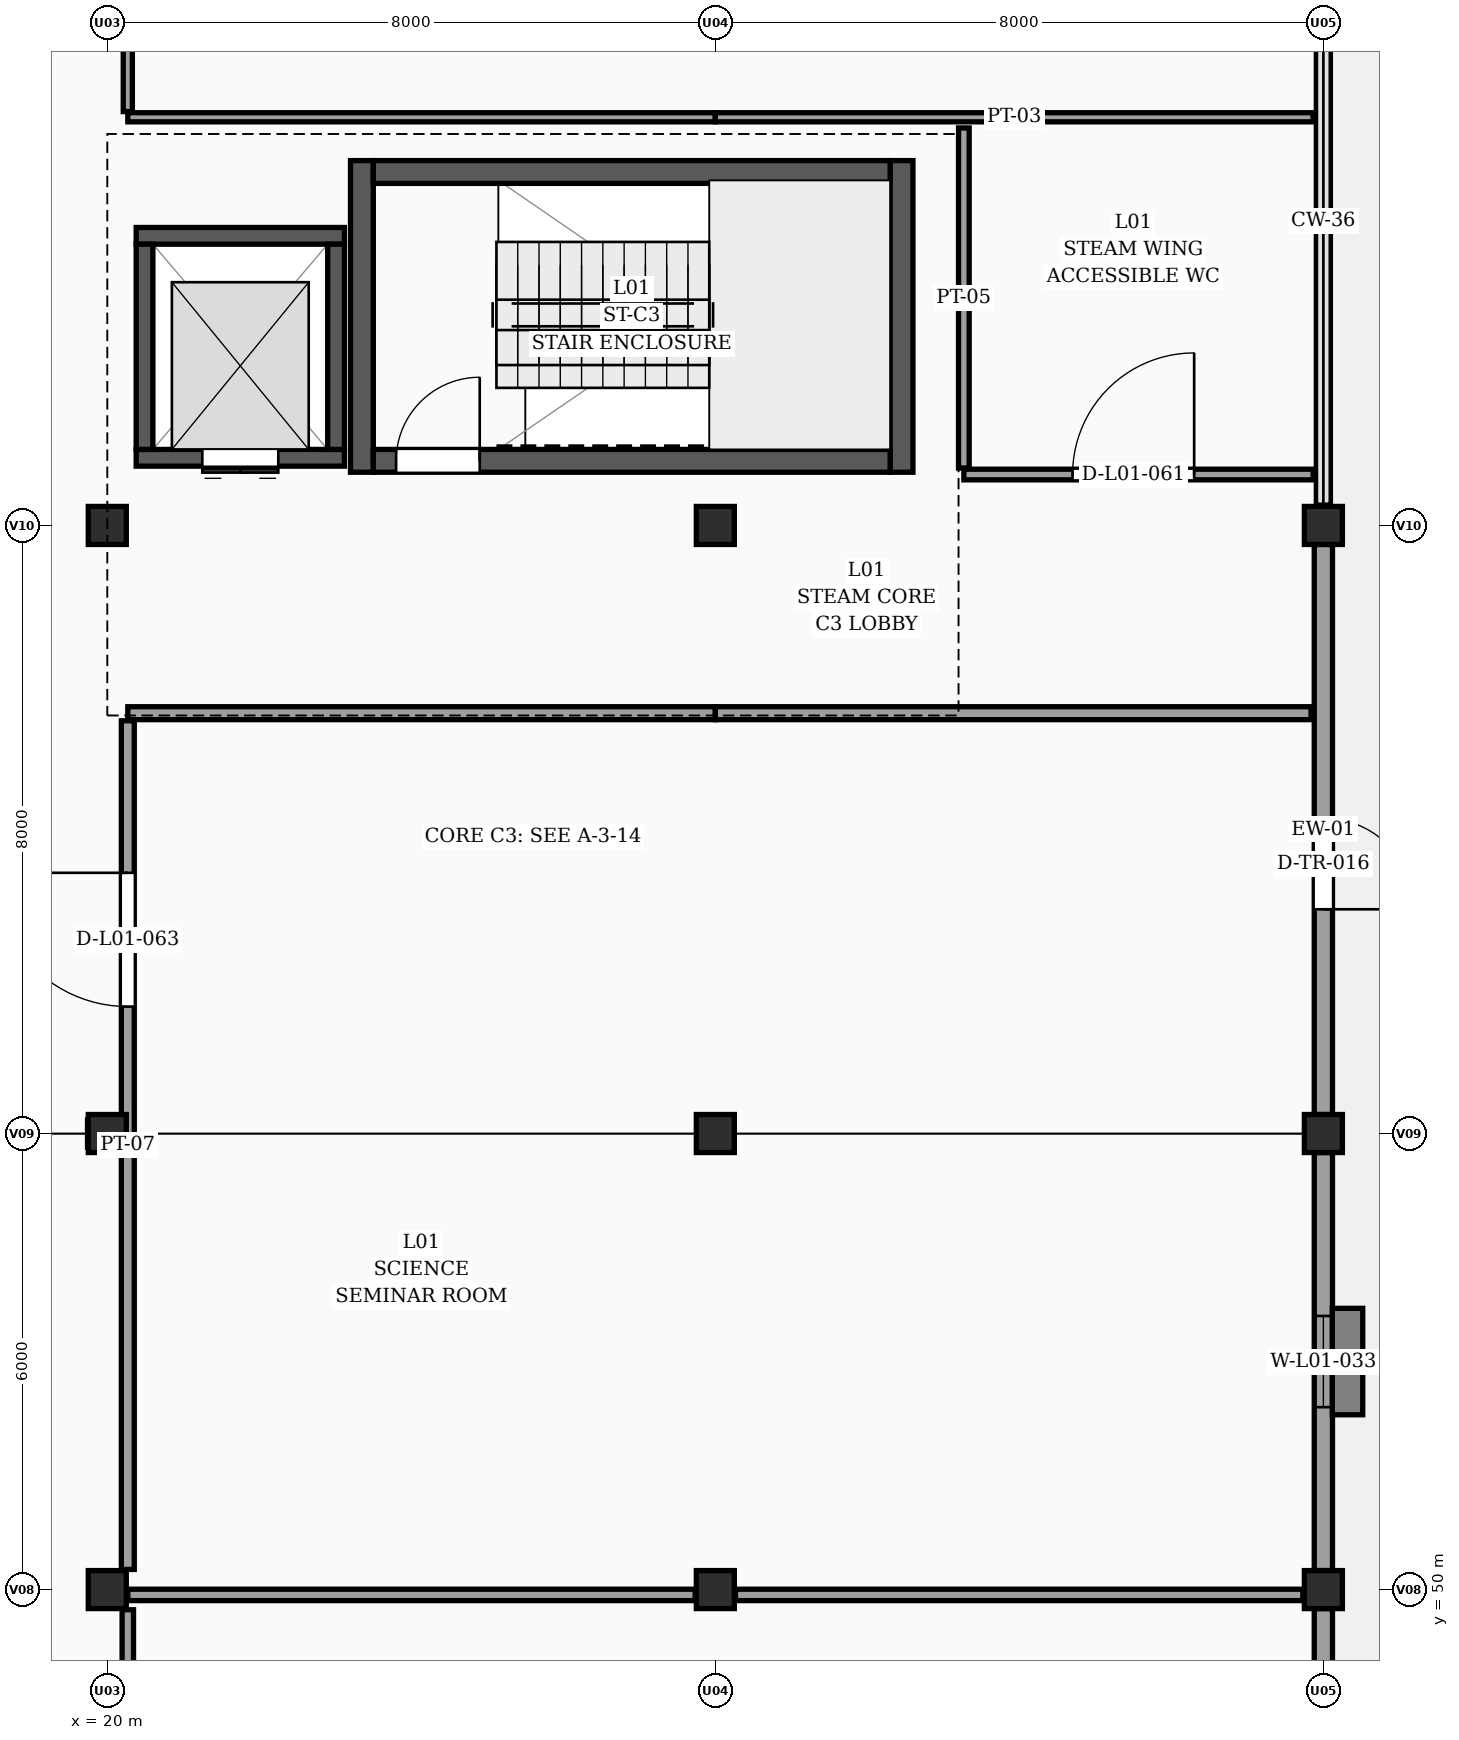
"""IFC4 building model, lengths in metres.
Left out: names, types, materials, properties, quantities, classifications, styles, units other than length and angle.
Written with IfcOpenShell. Run it as: python <this file> out.ifc"""

import sys

from ifc_helpers import new_model, si_unit, direction, frame, frame_2d, origin, origin_2d, place, context, subcontext, project, spatial, rectangle, extrude, element, fill, save


model = new_model("IFC4")
c1 = context("Model", 3, precision=1e-05, world=origin(), true_north=direction((0.0, 1.0)))
c2 = subcontext(c1, "Body", "Model", "MODEL_VIEW")
j1 = project(units=[si_unit("LENGTHUNIT", "METRE"), si_unit("PLANEANGLEUNIT", "RADIAN")], contexts=[c1])
p1 = place(None, origin())
s1 = spatial("IfcSite", under=j1, at=p1, CompositionType="ELEMENT")
p2 = place(p1, origin())
s2 = spatial("IfcBuilding", under=s1, at=p2, CompositionType="ELEMENT")
p3 = place(p2, frame((0.0, 0.0, 4.5)))
s3 = spatial("IfcBuildingStorey", under=s2, at=p3, CompositionType="ELEMENT", Elevation=4.5)
for number, where, z_axis, x_axis in (
    (1, (20.0, 50.0, 0.0), (0.0, 0.0, 1.0), (1.0, 0.0, 0.0)),
    (2, (20.0, 56.0, 0.0), (0.0, 0.0, 1.0), (1.0, 0.0, 0.0)),
    (3, (20.0, 64.0, 0.0), (0.0, 0.0, 1.0), (1.0, 0.0, 0.0)),
    (4, (28.0, 50.0, 0.0), (0.0, 0.0, 1.0), (1.0, 0.0, 0.0)),
    (5, (28.0, 56.0, 0.0), (0.0, 0.0, 1.0), (1.0, 0.0, 0.0)),
    (6, (28.0, 64.0, 0.0), (0.0, 0.0, 1.0), (1.0, 0.0, 0.0)),
    (7, (36.0, 50.0, 0.0), (0.0, 0.0, 1.0), (1.0, 0.0, 0.0)),
    (8, (36.0, 56.0, 0.0), (0.0, 0.0, 1.0), (1.0, 0.0, 0.0)),
    (9, (36.0, 64.0, 0.0), (0.0, 0.0, 1.0), (1.0, 0.0, 0.0)),
):
    element("IfcColumn", number, at=place(p3, frame(where, z_axis=z_axis, x_axis=x_axis)), inside=s3, PredefinedType="COLUMN", context=c2, shape_type="SweptSolid", body=[
        extrude(rectangle(XDim=0.5, YDim=0.5, at=origin_2d()), origin(), (0.0, 0.0, 1.0), 3.9),
    ])
p4 = place(p3, frame((36.0, 71.75, 0.0), z_axis=(0.0, 0.0, 1.0), x_axis=(0.0, -1.0, 0.0)))
e10 = element("IfcWall", 10, at=p4, inside=s3, PredefinedType="SOLIDWALL", context=c2, shape_type="SweptSolid", body=[
    extrude(rectangle(XDim=7.5, YDim=0.185, at=frame_2d((3.75, 0.0))), origin(), (0.0, 0.0, 1.0), 0.95),
])
p5 = place(p3, frame((36.0, 63.75, 0.0), z_axis=(0.0, 0.0, 1.0), x_axis=(0.0, -1.0, 0.0)))
e11 = element("IfcWall", 11, at=p5, inside=s3, PredefinedType="SOLIDWALL", context=c2, shape_type="SweptSolid", body=[
    extrude(rectangle(XDim=7.5, YDim=0.24, at=frame_2d((3.75, 0.0))), origin(), (0.0, 0.0, 1.0), 3.0),
])
p6 = place(p5, frame((3.6, 0.0, 0.0)))
e12 = element("IfcOpeningElement", 12, at=p6, cuts=e11, PredefinedType="OPENING", context=c2, shape_type="SweptSolid", body=[
    extrude(rectangle(XDim=1.2, YDim=2.15, at=frame_2d((0.6, 1.075))), frame((0.0, 0.13, 0.0), z_axis=(0.0, -1.0, 0.0), x_axis=(1.0, 0.0, 0.0)), (0.0, 0.0, 1.0), 0.26),
])
p7 = place(p3, frame((36.0, 55.75, 0.0), z_axis=(0.0, 0.0, 1.0), x_axis=(0.0, -1.0, 0.0)))
e13 = element("IfcWall", 13, at=p7, inside=s3, PredefinedType="SOLIDWALL", context=c2, shape_type="SweptSolid", body=[
    extrude(rectangle(XDim=5.5, YDim=0.24, at=frame_2d((2.75, 0.0))), origin(), (0.0, 0.0, 1.0), 3.0),
])
p8 = place(p7, frame((2.15, 0.0, 0.95)))
e14 = element("IfcOpeningElement", 14, at=p8, cuts=e13, PredefinedType="OPENING", context=c2, shape_type="SweptSolid", body=[
    extrude(rectangle(XDim=1.2, YDim=1.5, at=frame_2d((0.6, 0.75))), frame((0.0, 0.13, 0.0), z_axis=(0.0, -1.0, 0.0), x_axis=(1.0, 0.0, 0.0)), (0.0, 0.0, 1.0), 0.26),
])
p9 = place(p3, frame((36.0, 49.75, 0.0), z_axis=(0.0, 0.0, 1.0), x_axis=(0.0, -1.0, 0.0)))
e15 = element("IfcWall", 15, at=p9, inside=s3, PredefinedType="SOLIDWALL", context=c2, shape_type="SweptSolid", body=[
    extrude(rectangle(XDim=5.5, YDim=0.24, at=frame_2d((2.75, 0.0))), origin(), (0.0, 0.0, 1.0), 3.0),
])
p10 = place(p9, frame((2.075, 0.0, 0.95)))
e16 = element("IfcOpeningElement", 16, at=p10, cuts=e15, PredefinedType="OPENING", context=c2, shape_type="SweptSolid", body=[
    extrude(rectangle(XDim=1.35, YDim=1.5, at=frame_2d((0.675, 0.75))), frame((0.0, 0.13, 0.0), z_axis=(0.0, -1.0, 0.0), x_axis=(1.0, 0.0, 0.0)), (0.0, 0.0, 1.0), 0.26),
])
for number, where, z_axis, x_axis in (
    (17, (23.35, 64.7, 0.0), (0.0, 0.0, 1.0), (0.0, 1.0, 0.0)),
    (18, (30.45, 68.8, 0.0), (0.0, 0.0, 1.0), (0.0, -1.0, 0.0)),
):
    element("IfcWall", number, at=place(p3, frame(where, z_axis=z_axis, x_axis=x_axis)), inside=s3, PredefinedType="SHEAR", context=c2, shape_type="SweptSolid", body=[
        extrude(rectangle(XDim=4.1, YDim=0.3, at=frame_2d((2.05, 0.0))), origin(), (0.0, 0.0, 1.0), 3.65),
    ])
p11 = place(p3, frame((23.5, 64.85, 0.0), z_axis=(0.0, 0.0, 1.0), x_axis=(1.0, 0.0, 0.0)))
e19 = element("IfcWall", 19, at=p11, inside=s3, PredefinedType="SHEAR", context=c2, shape_type="SweptSolid", body=[
    extrude(rectangle(XDim=6.8, YDim=0.3, at=frame_2d((3.4, 0.0))), origin(), (0.0, 0.0, 1.0), 3.65),
])
p12 = place(p11, frame((0.3, 0.0, 0.0)))
e20 = element("IfcOpeningElement", 20, at=p12, cuts=e19, PredefinedType="OPENING", context=c2, shape_type="SweptSolid", body=[
    extrude(rectangle(XDim=1.1, YDim=2.15, at=frame_2d((0.55, 1.075))), frame((0.0, 0.16, 0.0), z_axis=(0.0, -1.0, 0.0), x_axis=(1.0, 0.0, 0.0)), (0.0, 0.0, 1.0), 0.32),
])
p13 = place(p3, frame((30.3, 68.65, 0.0), z_axis=(0.0, 0.0, 1.0), x_axis=(-1.0, 0.0, 0.0)))
e21 = element("IfcWall", 21, at=p13, inside=s3, PredefinedType="SHEAR", context=c2, shape_type="SweptSolid", body=[
    extrude(rectangle(XDim=6.8, YDim=0.3, at=frame_2d((3.4, 0.0))), origin(), (0.0, 0.0, 1.0), 3.65),
])
p14 = place(p3, frame((23.12, 64.89, 0.0), z_axis=(0.0, 0.0, 1.0), x_axis=(-1.0, 0.0, 0.0)))
e22 = element("IfcWall", 22, at=p14, inside=s3, PredefinedType="SHEAR", context=c2, shape_type="SweptSolid", body=[
    extrude(rectangle(XDim=2.74, YDim=0.22, at=frame_2d((1.37, 0.0))), origin(), (0.0, 0.0, 1.0), 3.65),
])
p15 = place(p14, frame((0.87, 0.0, 0.0)))
e23 = element("IfcOpeningElement", 23, at=p15, cuts=e22, PredefinedType="OPENING", context=c2, shape_type="SweptSolid", body=[
    extrude(rectangle(XDim=1.0, YDim=2.15, at=frame_2d((0.5, 1.075))), frame((0.0, 0.12, 0.0), z_axis=(0.0, -1.0, 0.0), x_axis=(1.0, 0.0, 0.0)), (0.0, 0.0, 1.0), 0.24),
])
p16 = place(p3, frame((20.38, 67.81, 0.0), z_axis=(0.0, 0.0, 1.0), x_axis=(1.0, 0.0, 0.0)))
e24 = element("IfcWall", 24, at=p16, inside=s3, PredefinedType="SHEAR", context=c2, shape_type="SweptSolid", body=[
    extrude(rectangle(XDim=2.74, YDim=0.22, at=frame_2d((1.37, 0.0))), origin(), (0.0, 0.0, 1.0), 3.65),
])
for number, where, z_axis, x_axis in (
    (25, (20.49, 65.0, 0.0), (0.0, 0.0, 1.0), (0.0, 1.0, 0.0)),
    (26, (23.01, 67.7, 0.0), (0.0, 0.0, 1.0), (0.0, -1.0, 0.0)),
):
    element("IfcWall", number, at=place(p3, frame(where, z_axis=z_axis, x_axis=x_axis)), inside=s3, PredefinedType="SHEAR", context=c2, shape_type="SweptSolid", body=[
        extrude(rectangle(XDim=2.7, YDim=0.22, at=frame_2d((1.35, 0.0))), origin(), (0.0, 0.0, 1.0), 3.65),
    ])
p17 = place(p3, frame((20.27, 69.37, 0.0), z_axis=(0.0, 0.0, 1.0), x_axis=(1.0, 0.0, 0.0)))
e27 = element("IfcWall", 27, at=p17, inside=s3, PredefinedType="PARTITIONING", context=c2, shape_type="SweptSolid", body=[
    extrude(rectangle(XDim=7.73, YDim=0.12, at=frame_2d((3.865, 0.0))), origin(), (0.0, 0.0, 1.0), 3.65),
])
p18 = place(p3, frame((28.0, 69.37, 0.0), z_axis=(0.0, 0.0, 1.0), x_axis=(1.0, 0.0, 0.0)))
e28 = element("IfcWall", 28, at=p18, inside=s3, PredefinedType="PARTITIONING", context=c2, shape_type="SweptSolid", body=[
    extrude(rectangle(XDim=7.865, YDim=0.12, at=frame_2d((3.933, 0.0))), origin(), (0.0, 0.0, 1.0), 3.65),
])
p19 = place(p3, frame((20.27, 69.445, 0.0), z_axis=(0.0, 0.0, 1.0), x_axis=(0.0, 1.0, 0.0)))
e29 = element("IfcWall", 29, at=p19, inside=s3, PredefinedType="PARTITIONING", context=c2, shape_type="SweptSolid", body=[
    extrude(rectangle(XDim=2.29, YDim=0.12, at=frame_2d((1.145, 0.0))), origin(), (0.0, 0.0, 1.0), 3.0),
])
p20 = place(p3, frame((31.27, 64.67, 0.0), z_axis=(0.0, 0.0, 1.0), x_axis=(1.0, 0.0, 0.0)))
e30 = element("IfcWall", 30, at=p20, inside=s3, PredefinedType="PARTITIONING", context=c2, shape_type="SweptSolid", body=[
    extrude(rectangle(XDim=4.595, YDim=0.14, at=frame_2d((2.298, 0.0))), origin(), (0.0, 0.0, 1.0), 3.65),
])
p21 = place(p20, frame((1.43, 0.0, 0.0)))
e31 = element("IfcOpeningElement", 31, at=p21, cuts=e30, PredefinedType="OPENING", context=c2, shape_type="SweptSolid", body=[
    extrude(rectangle(XDim=1.6, YDim=2.2, at=frame_2d((0.8, 1.1))), frame((0.0, 0.08, 0.0), z_axis=(0.0, -1.0, 0.0), x_axis=(1.0, 0.0, 0.0)), (0.0, 0.0, 1.0), 0.16),
])
p22 = place(p3, frame((31.27, 64.755, 0.0), z_axis=(0.0, 0.0, 1.0), x_axis=(0.0, 1.0, 0.0)))
e32 = element("IfcWall", 32, at=p22, inside=s3, PredefinedType="PARTITIONING", context=c2, shape_type="SweptSolid", body=[
    extrude(rectangle(XDim=4.475, YDim=0.14, at=frame_2d((2.238, 0.0))), origin(), (0.0, 0.0, 1.0), 3.65),
])
for number, where, z_axis, x_axis in (
    (33, (20.27, 49.93, 0.0), (0.0, 0.0, 1.0), (1.0, 0.0, 0.0)),
    (34, (28.265, 49.93, 0.0), (0.0, 0.0, 1.0), (1.0, 0.0, 0.0)),
):
    element("IfcWall", number, at=place(p3, frame(where, z_axis=z_axis, x_axis=x_axis)), inside=s3, PredefinedType="PARTITIONING", context=c2, shape_type="SweptSolid", body=[
        extrude(rectangle(XDim=7.465, YDim=0.15, at=frame_2d((3.732, 0.0))), origin(), (0.0, 0.0, 1.0), 3.0),
    ])
p23 = place(p3, frame((20.27, 38.265, 0.0), z_axis=(0.0, 0.0, 1.0), x_axis=(0.0, 1.0, 0.0)))
e35 = element("IfcWall", 35, at=p23, inside=s3, PredefinedType="PARTITIONING", context=c2, shape_type="SweptSolid", body=[
    extrude(rectangle(XDim=11.47, YDim=0.15, at=frame_2d((5.735, 0.0))), origin(), (0.0, 0.0, 1.0), 2.998),
])
p24 = place(p23, frame((7.895, 0.0, 0.0)))
e36 = element("IfcOpeningElement", 36, at=p24, cuts=e35, PredefinedType="OPENING", context=c2, shape_type="SweptSolid", body=[
    extrude(rectangle(XDim=1.68, YDim=2.2, at=frame_2d((0.84, 1.1))), frame((0.0, 0.085, 0.0), z_axis=(0.0, -1.0, 0.0), x_axis=(1.0, 0.0, 0.0)), (0.0, 0.0, 1.0), 0.17),
])
p25 = place(p3, frame((20.27, 61.53, 0.0), z_axis=(0.0, 0.0, 1.0), x_axis=(1.0, 0.0, 0.0)))
e37 = element("IfcWall", 37, at=p25, inside=s3, PredefinedType="PARTITIONING", context=c2, shape_type="SweptSolid", body=[
    extrude(rectangle(XDim=7.73, YDim=0.17, at=frame_2d((3.865, 0.0))), origin(), (0.0, 0.0, 1.0), 3.65),
])
p26 = place(p3, frame((28.0, 61.53, 0.0), z_axis=(0.0, 0.0, 1.0), x_axis=(1.0, 0.0, 0.0)))
e38 = element("IfcWall", 38, at=p26, inside=s3, PredefinedType="PARTITIONING", context=c2, shape_type="SweptSolid", body=[
    extrude(rectangle(XDim=7.838, YDim=0.17, at=frame_2d((3.919, 0.0))), origin(), (0.0, 0.0, 1.0), 3.65),
])
p27 = place(p3, frame((20.27, 50.265, 0.0), z_axis=(0.0, 0.0, 1.0), x_axis=(0.0, 1.0, 0.0)))
e39 = element("IfcWall", 39, at=p27, inside=s3, PredefinedType="PARTITIONING", context=c2, shape_type="SweptSolid", body=[
    extrude(rectangle(XDim=11.165, YDim=0.17, at=frame_2d((5.583, 0.0))), origin(), (0.0, 0.0, 1.0), 3.0),
])
p28 = place(p27, frame((7.405, 0.0, 0.0)))
e40 = element("IfcOpeningElement", 40, at=p28, cuts=e39, PredefinedType="OPENING", context=c2, shape_type="SweptSolid", body=[
    extrude(rectangle(XDim=1.76, YDim=2.2, at=frame_2d((0.88, 1.1))), frame((0.0, 0.095, 0.0), z_axis=(0.0, -1.0, 0.0), x_axis=(1.0, 0.0, 0.0)), (0.0, 0.0, 1.0), 0.19),
])
p29 = place(p6, origin())
e41 = element("IfcDoor", 41, at=p29, inside=s3, OperationType="SINGLE_SWING_RIGHT", PredefinedType="DOOR", context=c2, shape_type="SweptSolid", body=[
    extrude(rectangle(XDim=1.2, YDim=2.15, at=frame_2d((0.6, 1.075))), frame((0.0, 0.025, 0.0), z_axis=(0.0, -1.0, 0.0), x_axis=(1.0, 0.0, 0.0)), (0.0, 0.0, 1.0), 0.05),
])
fill(e12, e41)
p30 = place(p8, origin())
e42 = element("IfcWindow", 42, at=p30, inside=s3, PartitioningType="SINGLE_PANEL", PredefinedType="WINDOW", context=c2, shape_type="SweptSolid", body=[
    extrude(rectangle(XDim=1.2, YDim=1.5, at=frame_2d((0.6, 0.75))), frame((0.0, 0.03, 0.0), z_axis=(0.0, -1.0, 0.0), x_axis=(1.0, 0.0, 0.0)), (0.0, 0.0, 1.0), 0.06),
])
fill(e14, e42)
p31 = place(p12, origin())
e43 = element("IfcDoor", 43, at=p31, inside=s3, OperationType="SINGLE_SWING_RIGHT", PredefinedType="DOOR", context=c2, shape_type="SweptSolid", body=[
    extrude(rectangle(XDim=1.1, YDim=2.15, at=frame_2d((0.55, 1.075))), frame((0.0, 0.025, 0.0), z_axis=(0.0, -1.0, 0.0), x_axis=(1.0, 0.0, 0.0)), (0.0, 0.0, 1.0), 0.05),
])
fill(e20, e43)
p32 = place(p15, origin())
e44 = element("IfcDoor", 44, at=p32, inside=s3, OperationType="DOUBLE_DOOR_SLIDING", PredefinedType="DOOR", context=c2, shape_type="SweptSolid", body=[
    extrude(rectangle(XDim=1.0, YDim=2.15, at=frame_2d((0.5, 1.075))), frame((0.0, 0.025, 0.0), z_axis=(0.0, -1.0, 0.0), x_axis=(1.0, 0.0, 0.0)), (0.0, 0.0, 1.0), 0.05),
])
fill(e23, e44)
p33 = place(p21, origin())
e45 = element("IfcDoor", 45, at=p33, inside=s3, OperationType="SINGLE_SWING_RIGHT", PredefinedType="DOOR", context=c2, shape_type="SweptSolid", body=[
    extrude(rectangle(XDim=1.6, YDim=2.2, at=frame_2d((0.8, 1.1))), frame((0.0, 0.025, 0.0), z_axis=(0.0, -1.0, 0.0), x_axis=(1.0, 0.0, 0.0)), (0.0, 0.0, 1.0), 0.05),
])
fill(e31, e45)
p34 = place(p28, origin())
e46 = element("IfcDoor", 46, at=p34, inside=s3, OperationType="SINGLE_SWING_RIGHT", PredefinedType="DOOR", context=c2, shape_type="SweptSolid", body=[
    extrude(rectangle(XDim=1.76, YDim=2.2, at=frame_2d((0.88, 1.1))), frame((0.0, 0.025, 0.0), z_axis=(0.0, -1.0, 0.0), x_axis=(1.0, 0.0, 0.0)), (0.0, 0.0, 1.0), 0.05),
])
fill(e40, e46)
save(model, sys.argv[1])
